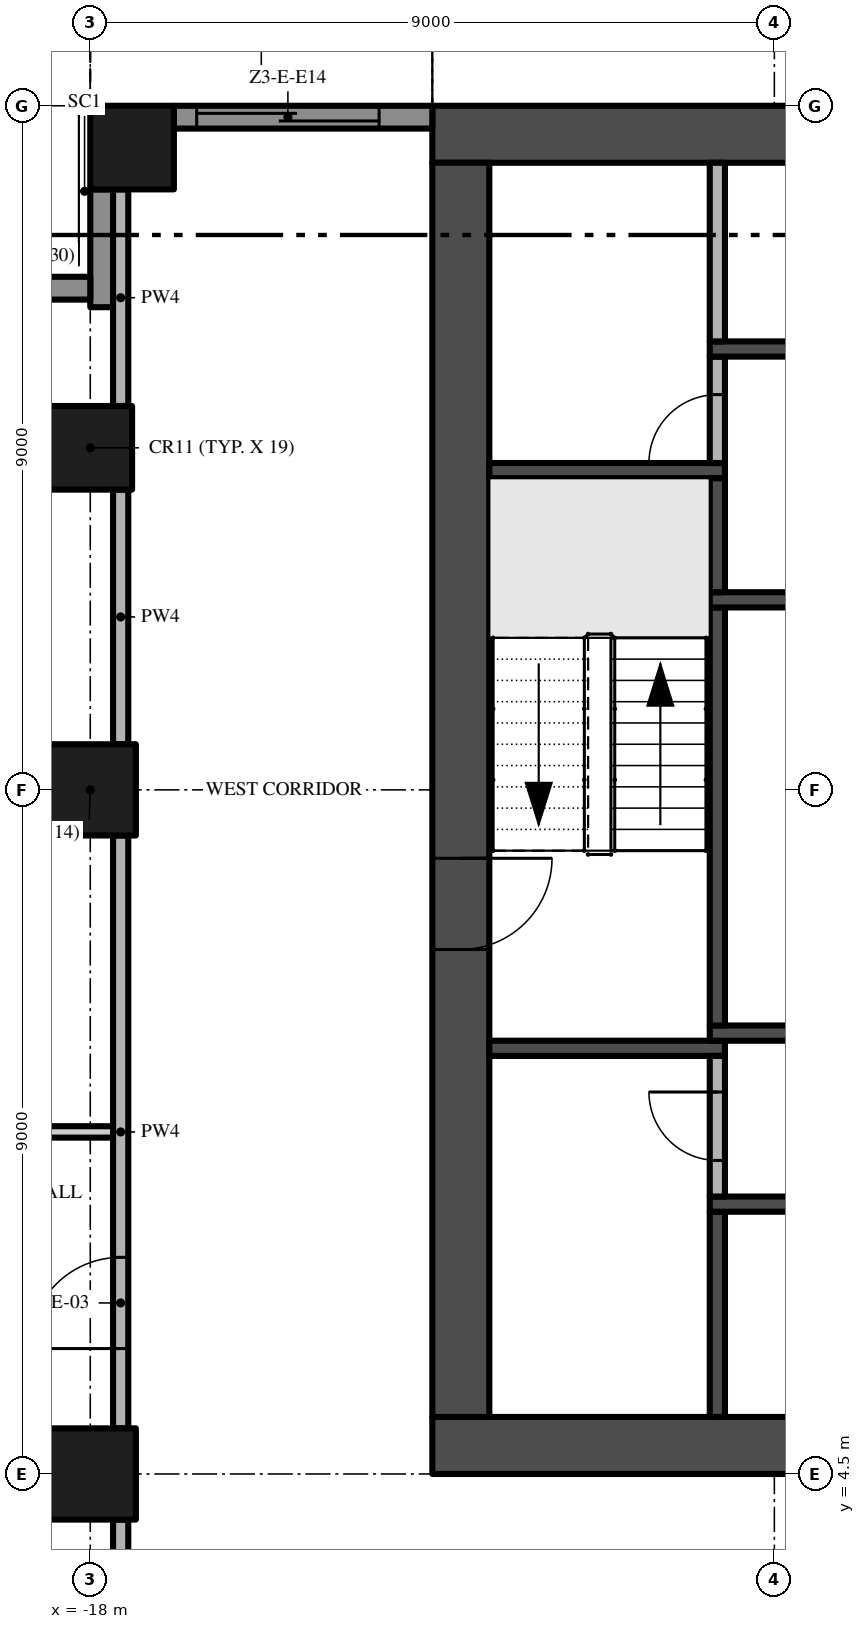
"""IFC4 building model, lengths in metres.
Left out: names, types, materials, properties, quantities, classifications, styles, units other than length and angle.
Written with IfcOpenShell. Run it as: python <this file> out.ifc"""

import sys

from ifc_helpers import new_model, si_unit, direction, frame, frame_2d, origin, origin_2d, place, context, subcontext, project, spatial, rectangle, extrude, element, fill, save


model = new_model("IFC4")
c1 = context("Model", 3, precision=1e-05, world=origin(), true_north=direction((0.0, 1.0)))
c2 = subcontext(c1, "Body", "Model", "MODEL_VIEW")
j1 = project(units=[si_unit("LENGTHUNIT", "METRE"), si_unit("PLANEANGLEUNIT", "RADIAN")], contexts=[c1])
p1 = place(None, origin())
s1 = spatial("IfcSite", under=j1, at=p1, CompositionType="ELEMENT")
p2 = place(p1, origin())
s2 = spatial("IfcBuilding", under=s1, at=p2, CompositionType="ELEMENT")
p3 = place(p2, frame((0.0, 0.0, 170.6)))
s3 = spatial("IfcBuildingStorey", under=s2, at=p3, CompositionType="ELEMENT", Elevation=170.6)
p4 = place(p3, frame((-13.5, 4.875, -0.3), z_axis=(0.0, 0.0, 1.0), x_axis=(1.0, 0.0, 0.0)))
e1 = element("IfcWall", 1, at=p4, inside=s3, PredefinedType="SHEAR", context=c2, shape_type="SweptSolid", body=[
    extrude(rectangle(XDim=27.0, YDim=0.75, at=frame_2d((13.5, 0.0))), origin(), (0.0, 0.0, 1.0), 3.8),
])
p5 = place(p4, frame((12.0, 0.0, 0.3)))
e2 = element("IfcOpeningElement", 2, at=p5, cuts=e1, PredefinedType="OPENING", context=c2, shape_type="SweptSolid", body=[
    extrude(rectangle(XDim=3.0, YDim=2.4, at=frame_2d((1.5, 1.2))), frame((0.0, 0.385, 0.0), z_axis=(0.0, -1.0, 0.0), x_axis=(1.0, 0.0, 0.0)), (0.0, 0.0, 1.0), 0.77),
])
p6 = place(p4, frame((4.9, 0.0, 0.3)))
e3 = element("IfcOpeningElement", 3, at=p6, cuts=e1, PredefinedType="OPENING", context=c2, shape_type="SweptSolid", body=[
    extrude(rectangle(XDim=1.2, YDim=2.2, at=frame_2d((0.6, 1.1))), frame((0.0, 0.385, 0.0), z_axis=(0.0, -1.0, 0.0), x_axis=(1.0, 0.0, 0.0)), (0.0, 0.0, 1.0), 0.77),
])
p7 = place(p4, frame((20.75, 0.0, 0.3)))
e4 = element("IfcOpeningElement", 4, at=p7, cuts=e1, PredefinedType="OPENING", context=c2, shape_type="SweptSolid", body=[
    extrude(rectangle(XDim=1.5, YDim=2.2, at=frame_2d((0.75, 1.1))), frame((0.0, 0.385, 0.0), z_axis=(0.0, -1.0, 0.0), x_axis=(1.0, 0.0, 0.0)), (0.0, 0.0, 1.0), 0.77),
])
p8 = place(p4, frame((17.4, 0.0, 0.3)))
e5 = element("IfcOpeningElement", 5, at=p8, cuts=e1, PredefinedType="OPENING", context=c2, shape_type="SweptSolid", body=[
    extrude(rectangle(XDim=1.2, YDim=2.2, at=frame_2d((0.6, 1.1))), frame((0.0, 0.385, 0.0), z_axis=(0.0, -1.0, 0.0), x_axis=(1.0, 0.0, 0.0)), (0.0, 0.0, 1.0), 0.77),
])
p9 = place(p3, frame((13.5, 22.125, -0.3), z_axis=(0.0, 0.0, 1.0), x_axis=(-1.0, 0.0, 0.0)))
e6 = element("IfcWall", 6, at=p9, inside=s3, PredefinedType="SHEAR", context=c2, shape_type="SweptSolid", body=[
    extrude(rectangle(XDim=27.0, YDim=0.75, at=frame_2d((13.5, 0.0))), origin(), (0.0, 0.0, 1.0), 3.8),
])
p10 = place(p3, frame((-13.125, 21.75, -0.3), z_axis=(0.0, 0.0, 1.0), x_axis=(0.0, -1.0, 0.0)))
e7 = element("IfcWall", 7, at=p10, inside=s3, PredefinedType="SHEAR", context=c2, shape_type="SweptSolid", body=[
    extrude(rectangle(XDim=16.5, YDim=0.75, at=frame_2d((8.25, 0.0))), origin(), (0.0, 0.0, 1.0), 3.8),
])
p11 = place(p10, frame((9.15, 0.0, 0.3)))
e8 = element("IfcOpeningElement", 8, at=p11, cuts=e7, PredefinedType="OPENING", context=c2, shape_type="SweptSolid", body=[
    extrude(rectangle(XDim=1.2, YDim=2.2, at=frame_2d((0.6, 1.1))), frame((0.0, 0.385, 0.0), z_axis=(0.0, -1.0, 0.0), x_axis=(1.0, 0.0, 0.0)), (0.0, 0.0, 1.0), 0.77),
])
p12 = place(p3, frame((-18.0, 13.5, 0.0), z_axis=(0.0, 0.0, 1.0), x_axis=(1.0, 0.0, 0.0)))
e9 = element("IfcColumn", 9, at=p12, inside=s3, PredefinedType="COLUMN", context=c2, shape_type="SweptSolid", body=[
    extrude(rectangle(XDim=1.2, YDim=1.2, at=origin_2d()), origin(), (0.0, 0.0, 1.0), 3.5),
])
p13 = place(p3, frame((-17.45, 21.95, 0.0), z_axis=(0.0, 0.0, 1.0), x_axis=(1.0, 0.0, 0.0)))
e10 = element("IfcColumn", 10, at=p13, inside=s3, PredefinedType="COLUMN", context=c2, shape_type="SweptSolid", body=[
    extrude(rectangle(XDim=1.1, YDim=1.1, at=origin_2d()), origin(), (0.0, 0.0, 1.0), 3.5),
])
p14 = place(p3, frame((-18.0, 4.5, 0.0), z_axis=(0.0, 0.0, 1.0), x_axis=(1.0, 0.0, 0.0)))
e11 = element("IfcColumn", 11, at=p14, inside=s3, PredefinedType="COLUMN", context=c2, shape_type="SweptSolid", body=[
    extrude(rectangle(XDim=1.2, YDim=1.2, at=origin_2d()), origin(), (0.0, 0.0, 1.0), 3.5),
])
p15 = place(p3, frame((-18.0, 18.0, 0.0), z_axis=(0.0, 0.0, 1.0), x_axis=(1.0, 0.0, 0.0)))
e12 = element("IfcColumn", 12, at=p15, inside=s3, PredefinedType="COLUMN", context=c2, shape_type="SweptSolid", body=[
    extrude(rectangle(XDim=1.1, YDim=1.1, at=origin_2d()), origin(), (0.0, 0.0, 1.0), 3.5),
])
p16 = place(p3, frame((-16.9, 22.35, 0.0), z_axis=(0.0, 0.0, 1.0), x_axis=(1.0, 0.0, 0.0)))
e13 = element("IfcWall", 13, at=p16, inside=s3, PredefinedType="SOLIDWALL", context=c2, shape_type="SweptSolid", body=[
    extrude(rectangle(XDim=3.4, YDim=0.3, at=frame_2d((1.7, 0.0))), origin(), (0.0, 0.0, 1.0), 3.5),
])
p17 = place(p16, frame((0.3, 0.0, 0.0)))
e14 = element("IfcOpeningElement", 14, at=p17, cuts=e13, PredefinedType="OPENING", context=c2, shape_type="SweptSolid", body=[
    extrude(rectangle(XDim=2.4, YDim=2.4, at=frame_2d((1.2, 1.2))), frame((0.0, 0.16, 0.0), z_axis=(0.0, -1.0, 0.0), x_axis=(1.0, 0.0, 0.0)), (0.0, 0.0, 1.0), 0.32),
])
p18 = place(p3, frame((-17.85, 19.85, 0.0), z_axis=(0.0, 0.0, 1.0), x_axis=(0.0, 1.0, 0.0)))
e15 = element("IfcWall", 15, at=p18, inside=s3, PredefinedType="SOLIDWALL", context=c2, shape_type="SweptSolid", body=[
    extrude(rectangle(XDim=1.55, YDim=0.3, at=frame_2d((0.775, 0.0))), origin(), (0.0, 0.0, 1.0), 3.5),
])
p19 = place(p3, frame((-20.25, 20.1, 0.0), z_axis=(0.0, 0.0, 1.0), x_axis=(1.0, 0.0, 0.0)))
e16 = element("IfcWall", 16, at=p19, inside=s3, PredefinedType="SOLIDWALL", context=c2, shape_type="SweptSolid", body=[
    extrude(rectangle(XDim=2.25, YDim=0.3, at=frame_2d((1.125, 0.0))), origin(), (0.0, 0.0, 1.0), 3.5),
])
for number, where, z_axis, x_axis in (
    (17, (-12.75, 10.1, 0.0), (0.0, 0.0, 1.0), (1.0, 0.0, 0.0)),
    (18, (-12.75, 17.7, 0.0), (0.0, 0.0, 1.0), (1.0, 0.0, 0.0)),
):
    element("IfcWall", number, at=place(p3, frame(where, z_axis=z_axis, x_axis=x_axis)), inside=s3, PredefinedType="SHEAR", context=c2, shape_type="SweptSolid", body=[
        extrude(rectangle(XDim=3.1, YDim=0.2, at=frame_2d((1.55, 0.0))), origin(), (0.0, 0.0, 1.0), 3.5),
    ])
p20 = place(p3, frame((-9.75, 5.25, 0.0), z_axis=(0.0, 0.0, 1.0), x_axis=(0.0, 1.0, 0.0)))
e19 = element("IfcWall", 19, at=p20, inside=s3, PredefinedType="SHEAR", context=c2, shape_type="SweptSolid", body=[
    extrude(rectangle(XDim=2.7, YDim=0.2, at=frame_2d((1.35, 0.0))), origin(), (0.0, 0.0, 1.0), 3.5),
])
p21 = place(p3, frame((-9.85, 8.05, 0.0), z_axis=(0.0, 0.0, 1.0), x_axis=(1.0, 0.0, 0.0)))
e20 = element("IfcWall", 20, at=p21, inside=s3, PredefinedType="SHEAR", context=c2, shape_type="SweptSolid", body=[
    extrude(rectangle(XDim=8.35, YDim=0.2, at=frame_2d((4.175, 0.0))), origin(), (0.0, 0.0, 1.0), 3.5),
])
p22 = place(p3, frame((-9.75, 8.15, 0.0), z_axis=(0.0, 0.0, 1.0), x_axis=(0.0, 1.0, 0.0)))
e21 = element("IfcWall", 21, at=p22, inside=s3, PredefinedType="PARTITIONING", context=c2, shape_type="SweptSolid", body=[
    extrude(rectangle(XDim=1.85, YDim=0.2, at=frame_2d((0.925, 0.0))), origin(), (0.0, 0.0, 1.0), 3.5),
])
p23 = place(p22, frame((0.475, 0.0, 0.0)))
e22 = element("IfcOpeningElement", 22, at=p23, cuts=e21, PredefinedType="OPENING", context=c2, shape_type="SweptSolid", body=[
    extrude(rectangle(XDim=0.9, YDim=2.1, at=frame_2d((0.45, 1.05))), frame((0.0, 0.11, 0.0), z_axis=(0.0, -1.0, 0.0), x_axis=(1.0, 0.0, 0.0)), (0.0, 0.0, 1.0), 0.22),
])
p24 = place(p3, frame((-9.85, 10.3, 0.0), z_axis=(0.0, 0.0, 1.0), x_axis=(1.0, 0.0, 0.0)))
e23 = element("IfcWall", 23, at=p24, inside=s3, PredefinedType="SHEAR", context=c2, shape_type="SweptSolid", body=[
    extrude(rectangle(XDim=8.35, YDim=0.2, at=frame_2d((4.175, 0.0))), origin(), (0.0, 0.0, 1.0), 3.5),
])
p25 = place(p3, frame((-9.75, 10.4, 0.0), z_axis=(0.0, 0.0, 1.0), x_axis=(0.0, 1.0, 0.0)))
e24 = element("IfcWall", 24, at=p25, inside=s3, PredefinedType="SHEAR", context=c2, shape_type="SweptSolid", body=[
    extrude(rectangle(XDim=5.5, YDim=0.2, at=frame_2d((2.75, 0.0))), origin(), (0.0, 0.0, 1.0), 3.5),
])
p26 = place(p3, frame((-1.5, 16.0, 0.0), z_axis=(0.0, 0.0, 1.0), x_axis=(-1.0, 0.0, 0.0)))
e25 = element("IfcWall", 25, at=p26, inside=s3, PredefinedType="SHEAR", context=c2, shape_type="SweptSolid", body=[
    extrude(rectangle(XDim=8.35, YDim=0.2, at=frame_2d((4.175, 0.0))), origin(), (0.0, 0.0, 1.0), 3.5),
])
p27 = place(p26, frame((6.162, 0.0, 0.0)))
e26 = element("IfcOpeningElement", 26, at=p27, cuts=e25, PredefinedType="OPENING", context=c2, shape_type="SweptSolid", body=[
    extrude(rectangle(XDim=0.9, YDim=2.1, at=frame_2d((0.45, 1.05))), frame((0.0, 0.11, 0.0), z_axis=(0.0, -1.0, 0.0), x_axis=(1.0, 0.0, 0.0)), (0.0, 0.0, 1.0), 0.22),
])
p28 = place(p3, frame((-9.75, 16.1, 0.0), z_axis=(0.0, 0.0, 1.0), x_axis=(0.0, 1.0, 0.0)))
e27 = element("IfcWall", 27, at=p28, inside=s3, PredefinedType="SHEAR", context=c2, shape_type="SweptSolid", body=[
    extrude(rectangle(XDim=1.5, YDim=0.2, at=frame_2d((0.75, 0.0))), origin(), (0.0, 0.0, 1.0), 3.5),
])
p29 = place(p3, frame((-9.75, 17.8, 0.0), z_axis=(0.0, 0.0, 1.0), x_axis=(0.0, 1.0, 0.0)))
e28 = element("IfcWall", 28, at=p29, inside=s3, PredefinedType="PARTITIONING", context=c2, shape_type="SweptSolid", body=[
    extrude(rectangle(XDim=1.4, YDim=0.2, at=frame_2d((0.7, 0.0))), origin(), (0.0, 0.0, 1.0), 3.5),
])
p30 = place(p29, origin())
e29 = element("IfcOpeningElement", 29, at=p30, cuts=e28, PredefinedType="OPENING", context=c2, shape_type="SweptSolid", body=[
    extrude(rectangle(XDim=0.9, YDim=2.1, at=frame_2d((0.45, 1.05))), frame((0.0, 0.11, 0.0), z_axis=(0.0, -1.0, 0.0), x_axis=(1.0, 0.0, 0.0)), (0.0, 0.0, 1.0), 0.22),
])
p31 = place(p3, frame((-9.85, 19.3, 0.0), z_axis=(0.0, 0.0, 1.0), x_axis=(1.0, 0.0, 0.0)))
e30 = element("IfcWall", 30, at=p31, inside=s3, PredefinedType="SHEAR", context=c2, shape_type="SweptSolid", body=[
    extrude(rectangle(XDim=19.7, YDim=0.2, at=frame_2d((9.85, 0.0))), origin(), (0.0, 0.0, 1.0), 3.5),
])
p32 = place(p31, frame((10.519, 0.0, 0.0)))
e31 = element("IfcOpeningElement", 31, at=p32, cuts=e30, PredefinedType="OPENING", context=c2, shape_type="SweptSolid", body=[
    extrude(rectangle(XDim=1.1, YDim=2.1, at=frame_2d((0.55, 1.05))), frame((0.0, 0.11, 0.0), z_axis=(0.0, -1.0, 0.0), x_axis=(1.0, 0.0, 0.0)), (0.0, 0.0, 1.0), 0.22),
])
p33 = place(p31, frame((12.956, 0.0, 0.0)))
e32 = element("IfcOpeningElement", 32, at=p33, cuts=e30, PredefinedType="OPENING", context=c2, shape_type="SweptSolid", body=[
    extrude(rectangle(XDim=1.1, YDim=2.1, at=frame_2d((0.55, 1.05))), frame((0.0, 0.11, 0.0), z_axis=(0.0, -1.0, 0.0), x_axis=(1.0, 0.0, 0.0)), (0.0, 0.0, 1.0), 0.22),
])
p34 = place(p31, frame((15.394, 0.0, 0.0)))
e33 = element("IfcOpeningElement", 33, at=p34, cuts=e30, PredefinedType="OPENING", context=c2, shape_type="SweptSolid", body=[
    extrude(rectangle(XDim=1.1, YDim=2.1, at=frame_2d((0.55, 1.05))), frame((0.0, 0.11, 0.0), z_axis=(0.0, -1.0, 0.0), x_axis=(1.0, 0.0, 0.0)), (0.0, 0.0, 1.0), 0.22),
])
p35 = place(p31, frame((17.831, 0.0, 0.0)))
e34 = element("IfcOpeningElement", 34, at=p35, cuts=e30, PredefinedType="OPENING", context=c2, shape_type="SweptSolid", body=[
    extrude(rectangle(XDim=1.1, YDim=2.1, at=frame_2d((0.55, 1.05))), frame((0.0, 0.11, 0.0), z_axis=(0.0, -1.0, 0.0), x_axis=(1.0, 0.0, 0.0)), (0.0, 0.0, 1.0), 0.22),
])
p36 = place(p31, frame((2.087, 0.0, 0.0)))
e35 = element("IfcOpeningElement", 35, at=p36, cuts=e30, PredefinedType="OPENING", context=c2, shape_type="SweptSolid", body=[
    extrude(rectangle(XDim=0.9, YDim=2.1, at=frame_2d((0.45, 1.05))), frame((0.0, 0.11, 0.0), z_axis=(0.0, -1.0, 0.0), x_axis=(1.0, 0.0, 0.0)), (0.0, 0.0, 1.0), 0.22),
])
p37 = place(p31, frame((6.963, 0.0, 0.0)))
e36 = element("IfcOpeningElement", 36, at=p37, cuts=e30, PredefinedType="OPENING", context=c2, shape_type="SweptSolid", body=[
    extrude(rectangle(XDim=0.9, YDim=2.1, at=frame_2d((0.45, 1.05))), frame((0.0, 0.11, 0.0), z_axis=(0.0, -1.0, 0.0), x_axis=(1.0, 0.0, 0.0)), (0.0, 0.0, 1.0), 0.22),
])
p38 = place(p3, frame((-9.75, 19.4, 0.0), z_axis=(0.0, 0.0, 1.0), x_axis=(0.0, 1.0, 0.0)))
e37 = element("IfcWall", 37, at=p38, inside=s3, PredefinedType="PARTITIONING", context=c2, shape_type="SweptSolid", body=[
    extrude(rectangle(XDim=2.35, YDim=0.2, at=frame_2d((1.175, 0.0))), origin(), (0.0, 0.0, 1.0), 3.5),
])
p39 = place(p3, frame((-22.2, 9.0, 0.0), z_axis=(0.0, 0.0, 1.0), x_axis=(1.0, 0.0, 0.0)))
e38 = element("IfcWall", 38, at=p39, inside=s3, PredefinedType="PARTITIONING", context=c2, shape_type="SweptSolid", body=[
    extrude(rectangle(XDim=4.5, YDim=0.15, at=frame_2d((2.25, 0.0))), origin(), (0.0, 0.0, 1.0), 3.5),
])
p40 = place(p39, frame((1.65, 0.0, 0.0)))
e39 = element("IfcOpeningElement", 39, at=p40, cuts=e38, PredefinedType="OPENING", context=c2, shape_type="SweptSolid", body=[
    extrude(rectangle(XDim=1.0, YDim=2.4, at=frame_2d((0.5, 1.2))), frame((0.0, 0.085, 0.0), z_axis=(0.0, -1.0, 0.0), x_axis=(1.0, 0.0, 0.0)), (0.0, 0.0, 1.0), 0.17),
])
p41 = place(p3, frame((-17.6, -0.2, 0.0), z_axis=(0.0, 0.0, 1.0), x_axis=(0.0, 1.0, 0.0)))
e40 = element("IfcWall", 40, at=p41, inside=s3, PredefinedType="PARTITIONING", context=c2, shape_type="SweptSolid", body=[
    extrude(rectangle(XDim=4.1, YDim=0.2, at=frame_2d((2.05, 0.0))), origin(), (0.0, 0.0, 1.0), 3.5),
])
p42 = place(p3, frame((-17.6, 5.1, 0.0), z_axis=(0.0, 0.0, 1.0), x_axis=(0.0, 1.0, 0.0)))
e41 = element("IfcWall", 41, at=p42, inside=s3, PredefinedType="PARTITIONING", context=c2, shape_type="SweptSolid", body=[
    extrude(rectangle(XDim=7.8, YDim=0.2, at=frame_2d((3.9, 0.0))), origin(), (0.0, 0.0, 1.0), 3.5),
])
p43 = place(p42, frame((1.05, 0.0, 0.0)))
e42 = element("IfcOpeningElement", 42, at=p43, cuts=e41, PredefinedType="OPENING", context=c2, shape_type="SweptSolid", body=[
    extrude(rectangle(XDim=1.2, YDim=2.4, at=frame_2d((0.6, 1.2))), frame((0.0, 0.11, 0.0), z_axis=(0.0, -1.0, 0.0), x_axis=(1.0, 0.0, 0.0)), (0.0, 0.0, 1.0), 0.22),
])
p44 = place(p3, frame((-17.6, 14.1, 0.0), z_axis=(0.0, 0.0, 1.0), x_axis=(0.0, 1.0, 0.0)))
e43 = element("IfcWall", 43, at=p44, inside=s3, PredefinedType="PARTITIONING", context=c2, shape_type="SweptSolid", body=[
    extrude(rectangle(XDim=3.35, YDim=0.2, at=frame_2d((1.675, 0.0))), origin(), (0.0, 0.0, 1.0), 3.5),
])
p45 = place(p3, frame((-17.6, 18.55, 0.0), z_axis=(0.0, 0.0, 1.0), x_axis=(0.0, 1.0, 0.0)))
e44 = element("IfcWall", 44, at=p45, inside=s3, PredefinedType="PARTITIONING", context=c2, shape_type="SweptSolid", body=[
    extrude(rectangle(XDim=2.85, YDim=0.2, at=frame_2d((1.425, 0.0))), origin(), (0.0, 0.0, 1.0), 3.5),
])
p46 = place(p17, origin())
e45 = element("IfcDoor", 45, at=p46, inside=s3, OperationType="SINGLE_SWING_LEFT", PredefinedType="DOOR", context=c2, shape_type="SweptSolid", body=[
    extrude(rectangle(XDim=2.4, YDim=2.4, at=frame_2d((1.2, 1.2))), frame((0.0, 0.025, 0.0), z_axis=(0.0, -1.0, 0.0), x_axis=(1.0, 0.0, 0.0)), (0.0, 0.0, 1.0), 0.05),
])
fill(e14, e45)
p47 = place(p11, frame((1.2, 0.0, 0.0), z_axis=(0.0, 0.0, 1.0), x_axis=(-1.0, 0.0, 0.0)))
e46 = element("IfcDoor", 46, at=p47, inside=s3, OperationType="SINGLE_SWING_RIGHT", PredefinedType="DOOR", context=c2, shape_type="SweptSolid", body=[
    extrude(rectangle(XDim=1.2, YDim=2.2, at=frame_2d((0.6, 1.1))), frame((0.0, 0.025, 0.0), z_axis=(0.0, -1.0, 0.0), x_axis=(1.0, 0.0, 0.0)), (0.0, 0.0, 1.0), 0.05),
])
fill(e8, e46)
p48 = place(p30, origin())
e47 = element("IfcDoor", 47, at=p48, inside=s3, OperationType="SINGLE_SWING_LEFT", PredefinedType="DOOR", context=c2, shape_type="SweptSolid", body=[
    extrude(rectangle(XDim=0.9, YDim=2.1, at=frame_2d((0.45, 1.05))), frame((0.0, 0.025, 0.0), z_axis=(0.0, -1.0, 0.0), x_axis=(1.0, 0.0, 0.0)), (0.0, 0.0, 1.0), 0.05),
])
fill(e29, e47)
p49 = place(p23, origin())
e48 = element("IfcDoor", 48, at=p49, inside=s3, OperationType="SINGLE_SWING_RIGHT", PredefinedType="DOOR", context=c2, shape_type="SweptSolid", body=[
    extrude(rectangle(XDim=0.9, YDim=2.1, at=frame_2d((0.45, 1.05))), frame((0.0, 0.025, 0.0), z_axis=(0.0, -1.0, 0.0), x_axis=(1.0, 0.0, 0.0)), (0.0, 0.0, 1.0), 0.05),
])
fill(e22, e48)
p50 = place(p43, origin())
e49 = element("IfcDoor", 49, at=p50, inside=s3, OperationType="SINGLE_SWING_LEFT", PredefinedType="DOOR", context=c2, shape_type="SweptSolid", body=[
    extrude(rectangle(XDim=1.2, YDim=2.4, at=frame_2d((0.6, 1.2))), frame((0.0, 0.025, 0.0), z_axis=(0.0, -1.0, 0.0), x_axis=(1.0, 0.0, 0.0)), (0.0, 0.0, 1.0), 0.05),
])
fill(e42, e49)
save(model, sys.argv[1])
